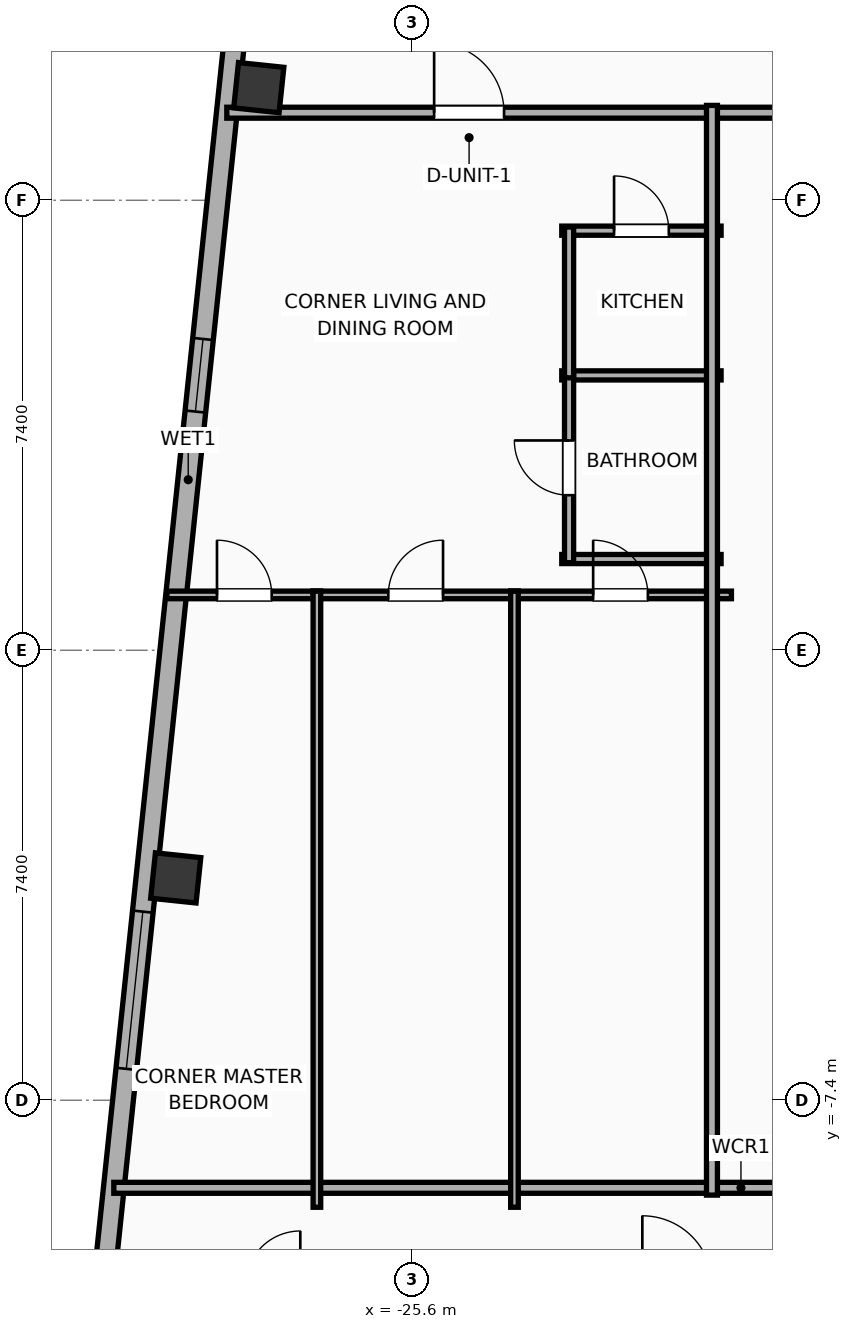
"""IFC4 building model, lengths in metres.
Left out: names, types, materials, properties, quantities, classifications, styles, units other than length and angle.
Written with IfcOpenShell. Run it as: python <this file> out.ifc"""

import sys

from ifc_helpers import new_model, si_unit, direction, frame, frame_2d, origin, origin_2d, place, context, subcontext, project, spatial, rectangle, hollow_rectangle, extrude, element, fill, save


model = new_model("IFC4")
c1 = context("Model", 3, precision=1e-05, world=origin(), true_north=direction((0.0, 1.0)))
c2 = subcontext(c1, "Body", "Model", "MODEL_VIEW")
j1 = project(units=[si_unit("LENGTHUNIT", "METRE"), si_unit("PLANEANGLEUNIT", "RADIAN")], contexts=[c1])
p1 = place(None, origin())
s1 = spatial("IfcSite", under=j1, at=p1, CompositionType="ELEMENT")
p2 = place(p1, origin())
s2 = spatial("IfcBuilding", under=s1, at=p2, CompositionType="ELEMENT")
p3 = place(p2, frame((0.0, 0.0, 306.8)))
s3 = spatial("IfcBuildingStorey", under=s2, at=p3, CompositionType="ELEMENT", Elevation=306.8)
for number, where, z_axis, x_axis in (
    (1, (-28.123, 9.252, 0.0), (0.0, 0.0, 1.0), (0.995, -0.105, 0.0)),
    (2, (-29.489, -3.744, 0.0), (0.0, 0.0, 1.0), (0.995, -0.105, 0.0)),
):
    element("IfcColumn", number, at=place(p3, frame(where, z_axis=z_axis, x_axis=x_axis)), inside=s3, PredefinedType="COLUMN", context=c2, shape_type="SweptSolid", body=[
        extrude(hollow_rectangle(XDim=0.75, YDim=0.75, WallThickness=0.025, at=origin_2d()), origin(), (0.0, 0.0, 1.0), 3.865),
    ])
p4 = place(p3, frame((-30.87, -12.296, 0.0), z_axis=(0.0, 0.0, 1.0), x_axis=(0.104533282919, 0.994521388791, 0.0)))
e3 = element("IfcWall", 3, at=p4, inside=s3, PredefinedType="ELEMENTEDWALL", context=c2, shape_type="SweptSolid", body=[
    extrude(rectangle(XDim=30.366, YDim=0.34, at=frame_2d((15.183, 0.0))), origin(), (0.0, 0.0, 1.0), 2.39),
])
p5 = place(p4, frame((5.442, 0.0, 0.65)))
e4 = element("IfcOpeningElement", 4, at=p5, cuts=e3, PredefinedType="OPENING", context=c2, shape_type="SweptSolid", body=[
    extrude(rectangle(XDim=2.6, YDim=1.45, at=frame_2d((1.3, 0.725))), frame((0.0, 0.18, 0.0), z_axis=(0.0, -1.0, 0.0), x_axis=(1.0, 0.0, 0.0)), (0.0, 0.0, 1.0), 0.36),
])
p6 = place(p4, frame((23.125, 0.0, 0.65)))
e5 = element("IfcOpeningElement", 5, at=p6, cuts=e3, PredefinedType="OPENING", context=c2, shape_type="SweptSolid", body=[
    extrude(rectangle(XDim=2.6, YDim=1.45, at=frame_2d((1.3, 0.725))), frame((0.0, 0.18, 0.0), z_axis=(0.0, -1.0, 0.0), x_axis=(1.0, 0.0, 0.0)), (0.0, 0.0, 1.0), 0.36),
])
p7 = place(p4, frame((27.192, 0.0, 0.55)))
e6 = element("IfcOpeningElement", 6, at=p7, cuts=e3, PredefinedType="OPENING", context=c2, shape_type="SweptSolid", body=[
    extrude(rectangle(XDim=1.2, YDim=1.15, at=frame_2d((0.6, 0.575))), frame((0.0, 0.18, 0.0), z_axis=(0.0, -1.0, 0.0), x_axis=(1.0, 0.0, 0.0)), (0.0, 0.0, 1.0), 0.36),
])
p8 = place(p4, frame((16.311, 0.0, 0.55)))
e7 = element("IfcOpeningElement", 7, at=p8, cuts=e3, PredefinedType="OPENING", context=c2, shape_type="SweptSolid", body=[
    extrude(rectangle(XDim=1.2, YDim=1.15, at=frame_2d((0.6, 0.575))), frame((0.0, 0.18, 0.0), z_axis=(0.0, -1.0, 0.0), x_axis=(1.0, 0.0, 0.0)), (0.0, 0.0, 1.0), 0.36),
])
p9 = place(p3, frame((-28.649, 8.84, 0.0), z_axis=(0.0, 0.0, 1.0), x_axis=(1.0, 0.0, 0.0)))
e8 = element("IfcWall", 8, at=p9, inside=s3, PredefinedType="PARTITIONING", context=c2, shape_type="SweptSolid", body=[
    extrude(rectangle(XDim=18.769, YDim=0.18, at=frame_2d((9.384, 0.0))), origin(), (0.0, 0.0, 1.0), 2.39),
])
p10 = place(p9, frame((3.41, 0.0, 0.0)))
e9 = element("IfcOpeningElement", 9, at=p10, cuts=e8, PredefinedType="OPENING", context=c2, shape_type="SweptSolid", body=[
    extrude(rectangle(XDim=1.15, YDim=2.05, at=frame_2d((0.575, 1.025))), frame((0.0, 0.1, 0.0), z_axis=(0.0, -1.0, 0.0), x_axis=(1.0, 0.0, 0.0)), (0.0, 0.0, 1.0), 0.2),
])
p11 = place(p3, frame((-30.507, -8.84, 0.0), z_axis=(0.0, 0.0, 1.0), x_axis=(1.0, 0.0, 0.0)))
e10 = element("IfcWall", 10, at=p11, inside=s3, PredefinedType="PARTITIONING", context=c2, shape_type="SweptSolid", body=[
    extrude(rectangle(XDim=20.627, YDim=0.18, at=frame_2d((10.313, 0.0))), origin(), (0.0, 0.0, 1.0), 3.5),
])
p12 = place(p3, frame((-23.14, 6.9, 0.0), z_axis=(0.0, 0.0, 1.0), x_axis=(1.0, 0.0, 0.0)))
e11 = element("IfcWall", 11, at=p12, inside=s3, PredefinedType="PLUMBINGWALL", context=c2, shape_type="SweptSolid", body=[
    extrude(rectangle(XDim=2.62, YDim=0.15, at=frame_2d((1.31, 0.0))), origin(), (0.0, 0.0, 1.0), 3.5),
])
p13 = place(p12, frame((0.86, 0.0, 0.0)))
e12 = element("IfcOpeningElement", 12, at=p13, cuts=e11, PredefinedType="OPENING", context=c2, shape_type="SweptSolid", body=[
    extrude(rectangle(XDim=0.9, YDim=2.05, at=frame_2d((0.45, 1.025))), frame((0.0, 0.085, 0.0), z_axis=(0.0, -1.0, 0.0), x_axis=(1.0, 0.0, 0.0)), (0.0, 0.0, 1.0), 0.17),
])
for number, where, z_axis, x_axis in (
    (13, (-23.14, 4.52, 0.0), (0.0, 0.0, 1.0), (1.0, 0.0, 0.0)),
    (14, (-23.14, 1.5, 0.0), (0.0, 0.0, 1.0), (1.0, 0.0, 0.0)),
):
    element("IfcWall", number, at=place(p3, frame(where, z_axis=z_axis, x_axis=x_axis)), inside=s3, PredefinedType="PLUMBINGWALL", context=c2, shape_type="SweptSolid", body=[
        extrude(rectangle(XDim=2.62, YDim=0.15, at=frame_2d((1.31, 0.0))), origin(), (0.0, 0.0, 1.0), 3.5),
    ])
p14 = place(p3, frame((-23.02, 1.44, 0.0), z_axis=(0.0, 0.0, 1.0), x_axis=(0.0, 1.0, 0.0)))
e15 = element("IfcWall", 15, at=p14, inside=s3, PredefinedType="PLUMBINGWALL", context=c2, shape_type="SweptSolid", body=[
    extrude(rectangle(XDim=3.12, YDim=0.15, at=frame_2d((1.56, 0.0))), origin(), (0.0, 0.0, 1.0), 3.5),
])
p15 = place(p14, frame((1.11, 0.0, 0.0)))
e16 = element("IfcOpeningElement", 16, at=p15, cuts=e15, PredefinedType="OPENING", context=c2, shape_type="SweptSolid", body=[
    extrude(rectangle(XDim=0.9, YDim=2.05, at=frame_2d((0.45, 1.025))), frame((0.0, 0.085, 0.0), z_axis=(0.0, -1.0, 0.0), x_axis=(1.0, 0.0, 0.0)), (0.0, 0.0, 1.0), 0.17),
])
p16 = place(p3, frame((-23.02, 4.48, 0.0), z_axis=(0.0, 0.0, 1.0), x_axis=(0.0, 1.0, 0.0)))
e17 = element("IfcWall", 17, at=p16, inside=s3, PredefinedType="PLUMBINGWALL", context=c2, shape_type="SweptSolid", body=[
    extrude(rectangle(XDim=2.48, YDim=0.15, at=frame_2d((1.24, 0.0))), origin(), (0.0, 0.0, 1.0), 3.5),
])
p17 = place(p3, frame((-29.633, 0.91, 0.0), z_axis=(0.0, 0.0, 1.0), x_axis=(1.0, 0.0, 0.0)))
e18 = element("IfcWall", 18, at=p17, inside=s3, PredefinedType="PARTITIONING", context=c2, shape_type="SweptSolid", body=[
    extrude(rectangle(XDim=2.529, YDim=0.125, at=frame_2d((1.264, 0.0))), origin(), (0.0, 0.0, 1.0), 3.5),
])
p18 = place(p17, frame((0.823, 0.0, 0.0)))
e19 = element("IfcOpeningElement", 19, at=p18, cuts=e18, PredefinedType="OPENING", context=c2, shape_type="SweptSolid", body=[
    extrude(rectangle(XDim=0.9, YDim=2.05, at=frame_2d((0.45, 1.025))), frame((0.0, 0.073, 0.0), z_axis=(0.0, -1.0, 0.0), x_axis=(1.0, 0.0, 0.0)), (0.0, 0.0, 1.0), 0.145),
])
p19 = place(p3, frame((-27.229, 0.91, 0.0), z_axis=(0.0, 0.0, 1.0), x_axis=(1.0, 0.0, 0.0)))
e20 = element("IfcWall", 20, at=p19, inside=s3, PredefinedType="PARTITIONING", context=c2, shape_type="SweptSolid", body=[
    extrude(rectangle(XDim=3.374, YDim=0.125, at=frame_2d((1.687, 0.0))), origin(), (0.0, 0.0, 1.0), 3.5),
])
p20 = place(p19, frame((1.237, 0.0, 0.0)))
e21 = element("IfcOpeningElement", 21, at=p20, cuts=e20, PredefinedType="OPENING", context=c2, shape_type="SweptSolid", body=[
    extrude(rectangle(XDim=0.9, YDim=2.05, at=frame_2d((0.45, 1.025))), frame((0.0, 0.073, 0.0), z_axis=(0.0, -1.0, 0.0), x_axis=(1.0, 0.0, 0.0)), (0.0, 0.0, 1.0), 0.145),
])
p21 = place(p3, frame((-23.98, 0.91, 0.0), z_axis=(0.0, 0.0, 1.0), x_axis=(1.0, 0.0, 0.0)))
e22 = element("IfcWall", 22, at=p21, inside=s3, PredefinedType="PARTITIONING", context=c2, shape_type="SweptSolid", body=[
    extrude(rectangle(XDim=3.63, YDim=0.125, at=frame_2d((1.815, 0.0))), origin(), (0.0, 0.0, 1.0), 3.5),
])
p22 = place(p21, frame((1.356, 0.0, 0.0)))
e23 = element("IfcOpeningElement", 23, at=p22, cuts=e22, PredefinedType="OPENING", context=c2, shape_type="SweptSolid", body=[
    extrude(rectangle(XDim=0.9, YDim=2.05, at=frame_2d((0.45, 1.025))), frame((0.0, 0.073, 0.0), z_axis=(0.0, -1.0, 0.0), x_axis=(1.0, 0.0, 0.0)), (0.0, 0.0, 1.0), 0.145),
])
for number, where, z_axis, x_axis in (
    (24, (-23.918, -9.16, 0.0), (0.0, 0.0, 1.0), (0.0, 1.0, 0.0)),
    (25, (-27.167, -9.16, 0.0), (0.0, 0.0, 1.0), (0.0, 1.0, 0.0)),
):
    element("IfcWall", number, at=place(p3, frame(where, z_axis=z_axis, x_axis=x_axis)), inside=s3, PredefinedType="PARTITIONING", context=c2, shape_type="SweptSolid", body=[
        extrude(rectangle(XDim=10.13, YDim=0.125, at=frame_2d((5.065, 0.0))), origin(), (0.0, 0.0, 1.0), 3.5),
    ])
p23 = place(p3, frame((-20.67, -8.96, 0.0), z_axis=(0.0, 0.0, 1.0), x_axis=(0.0, 1.0, 0.0)))
e26 = element("IfcWall", 26, at=p23, inside=s3, PredefinedType="PARTITIONING", context=c2, shape_type="SweptSolid", body=[
    extrude(rectangle(XDim=17.92, YDim=0.18, at=frame_2d((8.96, 0.0))), origin(), (0.0, 0.0, 1.0), 3.5),
])
p24 = place(p5, origin())
e27 = element("IfcWindow", 27, at=p24, inside=s3, PartitioningType="SINGLE_PANEL", PredefinedType="WINDOW", context=c2, shape_type="SweptSolid", body=[
    extrude(rectangle(XDim=2.6, YDim=1.45, at=frame_2d((1.3, 0.725))), frame((0.0, 0.03, 0.0), z_axis=(0.0, -1.0, 0.0), x_axis=(1.0, 0.0, 0.0)), (0.0, 0.0, 1.0), 0.06),
])
fill(e4, e27)
p25 = place(p8, origin())
e28 = element("IfcWindow", 28, at=p25, inside=s3, PartitioningType="SINGLE_PANEL", PredefinedType="WINDOW", context=c2, shape_type="SweptSolid", body=[
    extrude(rectangle(XDim=1.2, YDim=1.15, at=frame_2d((0.6, 0.575))), frame((0.0, 0.03, 0.0), z_axis=(0.0, -1.0, 0.0), x_axis=(1.0, 0.0, 0.0)), (0.0, 0.0, 1.0), 0.06),
])
fill(e7, e28)
p26 = place(p10, origin())
e29 = element("IfcDoor", 29, at=p26, inside=s3, OperationType="SINGLE_SWING_LEFT", PredefinedType="DOOR", context=c2, shape_type="SweptSolid", body=[
    extrude(rectangle(XDim=1.15, YDim=2.05, at=frame_2d((0.575, 1.025))), frame((0.0, 0.025, 0.0), z_axis=(0.0, -1.0, 0.0), x_axis=(1.0, 0.0, 0.0)), (0.0, 0.0, 1.0), 0.05),
])
fill(e9, e29)
p27 = place(p13, origin())
e30 = element("IfcDoor", 30, at=p27, inside=s3, OperationType="SINGLE_SWING_LEFT", PredefinedType="DOOR", context=c2, shape_type="SweptSolid", body=[
    extrude(rectangle(XDim=0.9, YDim=2.05, at=frame_2d((0.45, 1.025))), frame((0.0, 0.025, 0.0), z_axis=(0.0, -1.0, 0.0), x_axis=(1.0, 0.0, 0.0)), (0.0, 0.0, 1.0), 0.05),
])
fill(e12, e30)
p28 = place(p15, origin())
e31 = element("IfcDoor", 31, at=p28, inside=s3, OperationType="SINGLE_SWING_RIGHT", PredefinedType="DOOR", context=c2, shape_type="SweptSolid", body=[
    extrude(rectangle(XDim=0.9, YDim=2.05, at=frame_2d((0.45, 1.025))), frame((0.0, 0.025, 0.0), z_axis=(0.0, -1.0, 0.0), x_axis=(1.0, 0.0, 0.0)), (0.0, 0.0, 1.0), 0.05),
])
fill(e16, e31)
p29 = place(p18, origin())
e32 = element("IfcDoor", 32, at=p29, inside=s3, OperationType="SINGLE_SWING_LEFT", PredefinedType="DOOR", context=c2, shape_type="SweptSolid", body=[
    extrude(rectangle(XDim=0.9, YDim=2.05, at=frame_2d((0.45, 1.025))), frame((0.0, 0.025, 0.0), z_axis=(0.0, -1.0, 0.0), x_axis=(1.0, 0.0, 0.0)), (0.0, 0.0, 1.0), 0.05),
])
fill(e19, e32)
p30 = place(p20, origin())
e33 = element("IfcDoor", 33, at=p30, inside=s3, OperationType="SINGLE_SWING_RIGHT", PredefinedType="DOOR", context=c2, shape_type="SweptSolid", body=[
    extrude(rectangle(XDim=0.9, YDim=2.05, at=frame_2d((0.45, 1.025))), frame((0.0, 0.025, 0.0), z_axis=(0.0, -1.0, 0.0), x_axis=(1.0, 0.0, 0.0)), (0.0, 0.0, 1.0), 0.05),
])
fill(e21, e33)
p31 = place(p22, origin())
e34 = element("IfcDoor", 34, at=p31, inside=s3, OperationType="SINGLE_SWING_LEFT", PredefinedType="DOOR", context=c2, shape_type="SweptSolid", body=[
    extrude(rectangle(XDim=0.9, YDim=2.05, at=frame_2d((0.45, 1.025))), frame((0.0, 0.025, 0.0), z_axis=(0.0, -1.0, 0.0), x_axis=(1.0, 0.0, 0.0)), (0.0, 0.0, 1.0), 0.05),
])
fill(e23, e34)
save(model, sys.argv[1])
